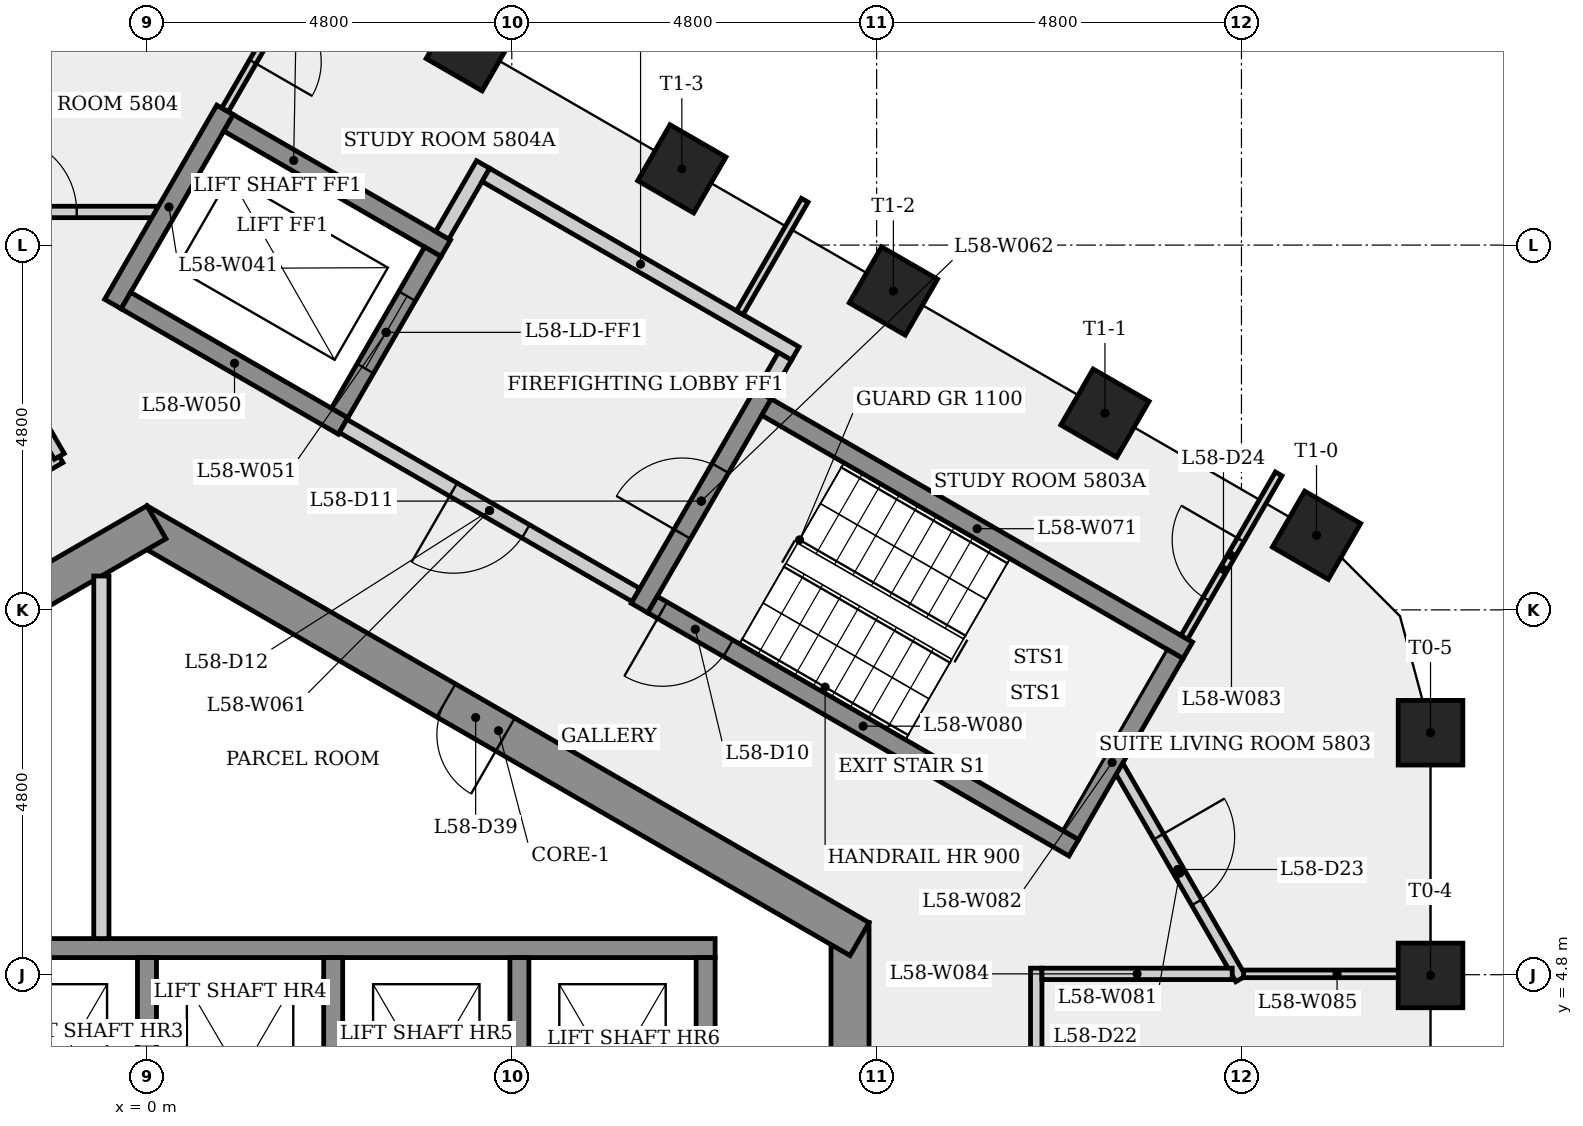
"""IFC4 building model, lengths in metres.
Left out: names, types, materials, properties, quantities, classifications, styles, units other than length and angle.
Written with IfcOpenShell. Run it as: python <this file> out.ifc"""

import sys

from ifc_helpers import new_model, si_unit, direction, frame, frame_2d, origin, origin_2d, place, context, subcontext, project, spatial, rectangle, extrude, element, fill, save


model = new_model("IFC4")
c1 = context("Model", 3, precision=1e-05, world=origin(), true_north=direction((0.0, 1.0)))
c2 = subcontext(c1, "Body", "Model", "MODEL_VIEW")
j1 = project(units=[si_unit("LENGTHUNIT", "METRE"), si_unit("PLANEANGLEUNIT", "RADIAN")], contexts=[c1])
p1 = place(None, origin())
s1 = spatial("IfcSite", under=j1, at=p1, CompositionType="ELEMENT")
p2 = place(p1, origin())
s2 = spatial("IfcBuilding", under=s1, at=p2, CompositionType="ELEMENT")
p3 = place(p2, frame((0.0, 0.0, 218.9)))
s3 = spatial("IfcBuildingStorey", under=s2, at=p3, CompositionType="ELEMENT", Elevation=218.9)
p4 = place(p3, frame((9.25, -5.485, 0.0), z_axis=(0.0, 0.0, 1.0), x_axis=(0.0, 1.0, 0.0)))
e1 = element("IfcWall", 1, at=p4, inside=s3, PredefinedType="SHEAR", context=c2, shape_type="SweptSolid", body=[
    extrude(rectangle(XDim=10.97, YDim=0.5, at=frame_2d((5.485, 0.0))), origin(), (0.0, 0.0, 1.0), 3.4),
])
p5 = place(p4, frame((4.685, 0.0, 0.0)))
e2 = element("IfcOpeningElement", 2, at=p5, cuts=e1, PredefinedType="OPENING", context=c2, shape_type="SweptSolid", body=[
    extrude(rectangle(XDim=1.6, YDim=2.1, at=frame_2d((0.8, 1.05))), frame((0.0, 0.26, 0.0), z_axis=(0.0, -1.0, 0.0), x_axis=(1.0, 0.0, 0.0)), (0.0, 0.0, 1.0), 0.52),
])
p6 = place(p3, frame((9.375, 5.268, 0.0), z_axis=(0.0, 0.0, 1.0), x_axis=(-0.866023993627, 0.500002442456, 0.0)))
e3 = element("IfcWall", 3, at=p6, inside=s3, PredefinedType="SHEAR", context=c2, shape_type="SweptSolid", body=[
    extrude(rectangle(XDim=10.97, YDim=0.5, at=frame_2d((5.485, 0.0))), origin(), (0.0, 0.0, 1.0), 3.4),
])
p7 = place(p6, frame((5.382, 0.0, 0.0)))
e4 = element("IfcOpeningElement", 4, at=p7, cuts=e3, PredefinedType="OPENING", context=c2, shape_type="SweptSolid", body=[
    extrude(rectangle(XDim=0.9, YDim=2.1, at=frame_2d((0.45, 1.05))), frame((0.0, 0.26, 0.0), z_axis=(0.0, -1.0, 0.0), x_axis=(1.0, 0.0, 0.0)), (0.0, 0.0, 1.0), 0.52),
])
p8 = place(p3, frame((0.125, 10.753, 0.0), z_axis=(0.0, 0.0, 1.0), x_axis=(-0.866023993627, -0.500002442456, 0.0)))
e5 = element("IfcWall", 5, at=p8, inside=s3, PredefinedType="SHEAR", context=c2, shape_type="SweptSolid", body=[
    extrude(rectangle(XDim=10.97, YDim=0.5, at=frame_2d((5.485, 0.0))), origin(), (0.0, 0.0, 1.0), 3.4),
])
p9 = place(p8, frame((7.08, 0.0, 0.0)))
e6 = element("IfcOpeningElement", 6, at=p9, cuts=e5, PredefinedType="OPENING", context=c2, shape_type="SweptSolid", body=[
    extrude(rectangle(XDim=0.9, YDim=2.1, at=frame_2d((0.45, 1.05))), frame((0.0, 0.26, 0.0), z_axis=(0.0, -1.0, 0.0), x_axis=(1.0, 0.0, 0.0)), (0.0, 0.0, 1.0), 0.52),
])
for number, where, z_axis, x_axis in (
    (7, (16.887, 4.79, 0.0), (0.0, 0.0, 1.0), (1.0, 0.0, 0.0)),
    (8, (16.887, 7.984, 0.0), (0.0, 0.0, 1.0), (1.0, 0.0, 0.0)),
    (9, (15.387, 10.582, 0.0), (0.0, 0.0, 1.0), (0.5, 0.866, 0.0)),
    (10, (12.604, 12.189, 0.0), (0.0, 0.0, 1.0), (0.5, 0.866, 0.0)),
    (11, (9.821, 13.796, 0.0), (0.0, 0.0, 1.0), (0.5, 0.866, 0.0)),
    (12, (7.037, 15.403, 0.0), (0.0, 0.0, 1.0), (0.5, 0.866, 0.0)),
    (13, (4.254, 17.01, 0.0), (0.0, 0.0, 1.0), (0.5, 0.866, 0.0)),
):
    element("IfcColumn", number, at=place(p3, frame(where, z_axis=z_axis, x_axis=x_axis)), inside=s3, PredefinedType="COLUMN", context=c2, shape_type="SweptSolid", body=[
        extrude(rectangle(XDim=0.85, YDim=0.85, at=origin_2d()), origin(), (0.0, 0.0, 1.0), 3.4),
    ])
p10 = place(p3, frame((-9.411, 6.829, 0.0), z_axis=(0.0, 0.0, 1.0), x_axis=(0.866029717158, 0.499992528944, 0.0)))
e14 = element("IfcWall", 14, at=p10, inside=s3, PredefinedType="PARTITIONING", context=c2, shape_type="SweptSolid", body=[
    extrude(rectangle(XDim=9.547, YDim=0.15, at=frame_2d((4.773, 0.0))), origin(), (0.0, 0.0, 1.0), 3.05),
])
p11 = place(p10, frame((4.273, 0.0, 0.0)))
e15 = element("IfcOpeningElement", 15, at=p11, cuts=e14, PredefinedType="OPENING", context=c2, shape_type="SweptSolid", body=[
    extrude(rectangle(XDim=1.0, YDim=2.1, at=frame_2d((0.5, 1.05))), frame((0.0, 0.085, 0.0), z_axis=(0.0, -1.0, 0.0), x_axis=(1.0, 0.0, 0.0)), (0.0, 0.0, 1.0), 0.17),
])
p12 = place(p3, frame((-7.225, 5.15, 0.0), z_axis=(0.0, 0.0, 1.0), x_axis=(1.0, 0.0, 0.0)))
e16 = element("IfcWall", 16, at=p12, inside=s3, PredefinedType="SHEAR", context=c2, shape_type="SweptSolid", body=[
    extrude(rectangle(XDim=14.7, YDim=0.25, at=frame_2d((7.35, 0.0))), origin(), (0.0, 0.0, 1.0), 3.05),
])
p13 = place(p3, frame((-3.085, 14.836, 0.0), z_axis=(0.0, 0.0, 1.0), x_axis=(1.0, 0.0, 0.0)))
e17 = element("IfcWall", 17, at=p13, inside=s3, PredefinedType="PARTITIONING", context=c2, shape_type="SweptSolid", body=[
    extrude(rectangle(XDim=3.212, YDim=0.15, at=frame_2d((1.606, 0.0))), origin(), (0.0, 0.0, 1.0), 3.05),
])
p14 = place(p13, frame((1.161, 0.0, 0.0)))
e18 = element("IfcOpeningElement", 18, at=p14, cuts=e17, PredefinedType="OPENING", context=c2, shape_type="SweptSolid", body=[
    extrude(rectangle(XDim=1.0, YDim=2.1, at=frame_2d((0.5, 1.05))), frame((0.0, 0.085, 0.0), z_axis=(0.0, -1.0, 0.0), x_axis=(1.0, 0.0, 0.0)), (0.0, 0.0, 1.0), 0.17),
])
p15 = place(p3, frame((-1.369, 11.993, 0.0), z_axis=(0.0, 0.0, 1.0), x_axis=(0.499853131152, -0.86611018195, 0.0)))
e19 = element("IfcWall", 19, at=p15, inside=s3, PredefinedType="PARTITIONING", context=c2, shape_type="SweptSolid", body=[
    extrude(rectangle(XDim=0.431, YDim=0.15, at=frame_2d((0.216, 0.0))), origin(), (0.0, 0.0, 1.0), 3.05),
])
p16 = place(p3, frame((-0.6, 10.046, 0.0), z_axis=(0.0, 0.0, 1.0), x_axis=(0.0, -1.0, 0.0)))
e20 = element("IfcWall", 20, at=p16, inside=s3, PredefinedType="PARTITIONING", context=c2, shape_type="SweptSolid", body=[
    extrude(rectangle(XDim=4.771, YDim=0.2, at=frame_2d((2.385, 0.0))), origin(), (0.0, 0.0, 1.0), 3.05),
])
p17 = place(p3, frame((-0.448, 13.624, 0.0), z_axis=(0.0, 0.0, 1.0), x_axis=(0.500037662692, 0.866003658127, 0.0)))
e21 = element("IfcWall", 21, at=p17, inside=s3, PredefinedType="SHEAR", context=c2, shape_type="SweptSolid", body=[
    extrude(rectangle(XDim=2.95, YDim=0.25, at=frame_2d((1.475, 0.0))), origin(), (0.0, 0.0, 1.0), 3.05),
])
p18 = place(p3, frame((0.0, 5.025, 0.0), z_axis=(0.0, 0.0, 1.0), x_axis=(0.0, -1.0, 0.0)))
e22 = element("IfcWall", 22, at=p18, inside=s3, PredefinedType="SHEAR", context=c2, shape_type="SweptSolid", body=[
    extrude(rectangle(XDim=3.1, YDim=0.25, at=frame_2d((1.55, 0.0))), origin(), (0.0, 0.0, 1.0), 3.4),
])
p19 = place(p3, frame((1.073, 16.008, 0.0), z_axis=(0.0, 0.0, 1.0), x_axis=(0.866040211805, -0.499974350878, 0.0)))
e23 = element("IfcWall", 23, at=p19, inside=s3, PredefinedType="SHEAR", context=c2, shape_type="SweptSolid", body=[
    extrude(rectangle(XDim=3.3, YDim=0.25, at=frame_2d((1.65, 0.0))), origin(), (0.0, 0.0, 1.0), 3.05),
])
p20 = place(p3, frame((2.419, 18.59, 0.0), z_axis=(0.0, 0.0, 1.0), x_axis=(-0.500016013541, -0.866016158165, 0.0)))
e24 = element("IfcWall", 24, at=p20, inside=s3, PredefinedType="PARTITIONING", context=c2, shape_type="SweptSolid", body=[
    extrude(rectangle(XDim=2.784, YDim=0.1, at=frame_2d((1.392, 0.0))), origin(), (0.0, 0.0, 1.0), 3.05),
])
p21 = place(p20, frame((1.152, 0.0, 0.0)))
e25 = element("IfcOpeningElement", 25, at=p21, cuts=e24, PredefinedType="OPENING", context=c2, shape_type="SweptSolid", body=[
    extrude(rectangle(XDim=0.9, YDim=2.1, at=frame_2d((0.45, 1.05))), frame((0.0, 0.06, 0.0), z_axis=(0.0, -1.0, 0.0), x_axis=(1.0, 0.0, 0.0)), (0.0, 0.0, 1.0), 0.12),
])
p22 = place(p3, frame((2.45, 5.025, 0.0), z_axis=(0.0, 0.0, 1.0), x_axis=(0.0, -1.0, 0.0)))
e26 = element("IfcWall", 26, at=p22, inside=s3, PredefinedType="SHEAR", context=c2, shape_type="SweptSolid", body=[
    extrude(rectangle(XDim=3.1, YDim=0.25, at=frame_2d((1.55, 0.0))), origin(), (0.0, 0.0, 1.0), 3.4),
])
p23 = place(p3, frame((2.581, 12.02, 0.0), z_axis=(0.0, 0.0, 1.0), x_axis=(-0.866040211805, 0.499974350878, 0.0)))
e27 = element("IfcWall", 27, at=p23, inside=s3, PredefinedType="SHEAR", context=c2, shape_type="SweptSolid", body=[
    extrude(rectangle(XDim=3.3, YDim=0.25, at=frame_2d((1.65, 0.0))), origin(), (0.0, 0.0, 1.0), 3.05),
])
p24 = place(p3, frame((2.535, 12.191, 0.0), z_axis=(0.0, 0.0, 1.0), x_axis=(0.500061746146, 0.865989751695, 0.0)))
e28 = element("IfcWall", 28, at=p24, inside=s3, PredefinedType="SHEAR", context=c2, shape_type="SweptSolid", body=[
    extrude(rectangle(XDim=2.45, YDim=0.25, at=frame_2d((1.225, 0.0))), origin(), (0.0, 0.0, 1.0), 3.4),
])
p25 = place(p24, frame((0.675, 0.0, 0.0)))
e29 = element("IfcOpeningElement", 29, at=p25, cuts=e28, PredefinedType="OPENING", context=c2, shape_type="SweptSolid", body=[
    extrude(rectangle(XDim=1.1, YDim=2.1, at=frame_2d((0.55, 1.05))), frame((0.0, 0.135, 0.0), z_axis=(0.0, -1.0, 0.0), x_axis=(1.0, 0.0, 0.0)), (0.0, 0.0, 1.0), 0.27),
])
p26 = place(p3, frame((3.885, 14.529, 0.0), z_axis=(0.0, 0.0, 1.0), x_axis=(0.499997628298, 0.866026773083, 0.0)))
e30 = element("IfcWall", 30, at=p26, inside=s3, PredefinedType="PARTITIONING", context=c2, shape_type="SweptSolid", body=[
    extrude(rectangle(XDim=1.075, YDim=0.2, at=frame_2d((0.538, 0.0))), origin(), (0.0, 0.0, 1.0), 3.05),
])
p27 = place(p3, frame((4.459, 15.323, 0.0), z_axis=(0.0, 0.0, 1.0), x_axis=(0.866016039709, -0.500016218704, 0.0)))
e31 = element("IfcWall", 31, at=p27, inside=s3, PredefinedType="PARTITIONING", context=c2, shape_type="SweptSolid", body=[
    extrude(rectangle(XDim=4.7, YDim=0.2, at=frame_2d((2.35, 0.0))), origin(), (0.0, 0.0, 1.0), 3.05),
])
p28 = place(p3, frame((4.9, 5.025, 0.0), z_axis=(0.0, 0.0, 1.0), x_axis=(0.0, -1.0, 0.0)))
e32 = element("IfcWall", 32, at=p28, inside=s3, PredefinedType="SHEAR", context=c2, shape_type="SweptSolid", body=[
    extrude(rectangle(XDim=3.1, YDim=0.25, at=frame_2d((1.55, 0.0))), origin(), (0.0, 0.0, 1.0), 3.4),
])
p29 = place(p3, frame((6.435, 9.795, 0.0), z_axis=(0.0, 0.0, 1.0), x_axis=(-0.866012907634, 0.500021643343, 0.0)))
e33 = element("IfcWall", 33, at=p29, inside=s3, PredefinedType="PARTITIONING", context=c2, shape_type="SweptSolid", body=[
    extrude(rectangle(XDim=4.45, YDim=0.2, at=frame_2d((2.225, 0.0))), origin(), (0.0, 0.0, 1.0), 3.05),
])
p30 = place(p29, frame((1.675, 0.0, 0.0)))
e34 = element("IfcOpeningElement", 34, at=p30, cuts=e33, PredefinedType="OPENING", context=c2, shape_type="SweptSolid", body=[
    extrude(rectangle(XDim=1.1, YDim=2.1, at=frame_2d((0.55, 1.05))), frame((0.0, 0.11, 0.0), z_axis=(0.0, -1.0, 0.0), x_axis=(1.0, 0.0, 0.0)), (0.0, 0.0, 1.0), 0.22),
])
p31 = place(p3, frame((6.48, 9.624, 0.0), z_axis=(0.0, 0.0, 1.0), x_axis=(0.500017246033, 0.866015446554, 0.0)))
e35 = element("IfcWall", 35, at=p31, inside=s3, PredefinedType="SHEAR", context=c2, shape_type="SweptSolid", body=[
    extrude(rectangle(XDim=3.25, YDim=0.25, at=frame_2d((1.625, 0.0))), origin(), (0.0, 0.0, 1.0), 3.05),
])
p32 = place(p31, frame((1.125, 0.0, 0.0)))
e36 = element("IfcOpeningElement", 36, at=p32, cuts=e35, PredefinedType="OPENING", context=c2, shape_type="SweptSolid", body=[
    extrude(rectangle(XDim=1.0, YDim=2.1, at=frame_2d((0.5, 1.05))), frame((0.0, 0.135, 0.0), z_axis=(0.0, -1.0, 0.0), x_axis=(1.0, 0.0, 0.0)), (0.0, 0.0, 1.0), 0.27),
])
p33 = place(p3, frame((7.35, 5.025, 0.0), z_axis=(0.0, 0.0, 1.0), x_axis=(0.0, -1.0, 0.0)))
e37 = element("IfcWall", 37, at=p33, inside=s3, PredefinedType="SHEAR", context=c2, shape_type="SweptSolid", body=[
    extrude(rectangle(XDim=3.1, YDim=0.25, at=frame_2d((1.55, 0.0))), origin(), (0.0, 0.0, 1.0), 3.4),
])
p34 = place(p3, frame((7.8, 13.51, 0.0), z_axis=(0.0, 0.0, 1.0), x_axis=(0.500027584368, 0.866009477356, 0.0)))
e38 = element("IfcWall", 38, at=p34, inside=s3, PredefinedType="PARTITIONING", context=c2, shape_type="SweptSolid", body=[
    extrude(rectangle(XDim=1.708, YDim=0.1, at=frame_2d((0.854, 0.0))), origin(), (0.0, 0.0, 1.0), 3.05),
])
p35 = place(p3, frame((8.151, 12.268, 0.0), z_axis=(0.0, 0.0, 1.0), x_axis=(0.866025499775, -0.499999833739, 0.0)))
e39 = element("IfcWall", 39, at=p35, inside=s3, PredefinedType="SHEAR", context=c2, shape_type="SweptSolid", body=[
    extrude(rectangle(XDim=6.4, YDim=0.25, at=frame_2d((3.2, 0.0))), origin(), (0.0, 0.0, 1.0), 3.05),
])
p36 = place(p3, frame((8.393, 12.937, 0.0), z_axis=(0.0, 0.0, 1.0), x_axis=(-0.500065409566, -0.86598763626, 0.0)))
e40 = element("IfcWall", 40, at=p36, inside=s3, PredefinedType="PARTITIONING", context=c2, shape_type="SweptSolid", body=[
    extrude(rectangle(XDim=0.575, YDim=0.2, at=frame_2d((0.288, 0.0))), origin(), (0.0, 0.0, 1.0), 3.05),
])
p37 = place(p3, frame((11.7, -4.736, 0.0), z_axis=(0.0, 0.0, 1.0), x_axis=(0.0, 1.0, 0.0)))
e41 = element("IfcWall", 41, at=p37, inside=s3, PredefinedType="PARTITIONING", context=c2, shape_type="SweptSolid", body=[
    extrude(rectangle(XDim=9.622, YDim=0.15, at=frame_2d((4.811, 0.0))), origin(), (0.0, 0.0, 1.0), 3.05),
])
p38 = place(p37, frame((2.655, 0.0, 0.0)))
e42 = element("IfcOpeningElement", 42, at=p38, cuts=e41, PredefinedType="OPENING", context=c2, shape_type="SweptSolid", body=[
    extrude(rectangle(XDim=1.0, YDim=2.1, at=frame_2d((0.5, 1.05))), frame((0.0, 0.085, 0.0), z_axis=(0.0, -1.0, 0.0), x_axis=(1.0, 0.0, 0.0)), (0.0, 0.0, 1.0), 0.17),
])
p39 = place(p37, frame((7.443, 0.0, 0.0)))
e43 = element("IfcOpeningElement", 43, at=p39, cuts=e41, PredefinedType="OPENING", context=c2, shape_type="SweptSolid", body=[
    extrude(rectangle(XDim=1.0, YDim=2.1, at=frame_2d((0.5, 1.05))), frame((0.0, 0.085, 0.0), z_axis=(0.0, -1.0, 0.0), x_axis=(1.0, 0.0, 0.0)), (0.0, 0.0, 1.0), 0.17),
])
p40 = place(p3, frame((12.194, 6.47, 0.0), z_axis=(0.0, 0.0, 1.0), x_axis=(-0.866025499775, 0.499999833739, 0.0)))
e44 = element("IfcWall", 44, at=p40, inside=s3, PredefinedType="SHEAR", context=c2, shape_type="SweptSolid", body=[
    extrude(rectangle(XDim=6.4, YDim=0.25, at=frame_2d((3.2, 0.0))), origin(), (0.0, 0.0, 1.0), 3.05),
])
p41 = place(p40, frame((5.25, 0.0, 0.0)))
e45 = element("IfcOpeningElement", 45, at=p41, cuts=e44, PredefinedType="OPENING", context=c2, shape_type="SweptSolid", body=[
    extrude(rectangle(XDim=1.0, YDim=2.1, at=frame_2d((0.5, 1.05))), frame((0.0, 0.135, 0.0), z_axis=(0.0, -1.0, 0.0), x_axis=(1.0, 0.0, 0.0)), (0.0, 0.0, 1.0), 0.27),
])
p42 = place(p3, frame((12.785, 7.528, 0.0), z_axis=(0.0, 0.0, 1.0), x_axis=(0.500038251005, -0.86600331843, 0.0)))
e46 = element("IfcWall", 46, at=p42, inside=s3, PredefinedType="PARTITIONING", context=c2, shape_type="SweptSolid", body=[
    extrude(rectangle(XDim=3.212, YDim=0.15, at=frame_2d((1.606, 0.0))), origin(), (0.0, 0.0, 1.0), 3.05),
])
p43 = place(p42, frame((1.051, 0.0, 0.0)))
e47 = element("IfcOpeningElement", 47, at=p43, cuts=e46, PredefinedType="OPENING", context=c2, shape_type="SweptSolid", body=[
    extrude(rectangle(XDim=1.0, YDim=2.1, at=frame_2d((0.5, 1.05))), frame((0.0, 0.085, 0.0), z_axis=(0.0, -1.0, 0.0), x_axis=(1.0, 0.0, 0.0)), (0.0, 0.0, 1.0), 0.17),
])
p44 = place(p3, frame((12.148, 6.641, 0.0), z_axis=(0.0, 0.0, 1.0), x_axis=(0.500034990121, 0.866005201286, 0.0)))
e48 = element("IfcWall", 48, at=p44, inside=s3, PredefinedType="SHEAR", context=c2, shape_type="SweptSolid", body=[
    extrude(rectangle(XDim=2.75, YDim=0.25, at=frame_2d((1.375, 0.0))), origin(), (0.0, 0.0, 1.0), 3.05),
])
p45 = place(p3, frame((13.648, 9.239, 0.0), z_axis=(0.0, 0.0, 1.0), x_axis=(0.500040114371, 0.866002242503, 0.0)))
e49 = element("IfcWall", 49, at=p45, inside=s3, PredefinedType="PARTITIONING", context=c2, shape_type="SweptSolid", body=[
    extrude(rectangle(XDim=2.484, YDim=0.1, at=frame_2d((1.242, 0.0))), origin(), (0.0, 0.0, 1.0), 3.05),
])
p46 = place(p45, frame((0.581, 0.0, 0.0)))
e50 = element("IfcOpeningElement", 50, at=p46, cuts=e49, PredefinedType="OPENING", context=c2, shape_type="SweptSolid", body=[
    extrude(rectangle(XDim=0.9, YDim=2.1, at=frame_2d((0.45, 1.05))), frame((0.0, 0.06, 0.0), z_axis=(0.0, -1.0, 0.0), x_axis=(1.0, 0.0, 0.0)), (0.0, 0.0, 1.0), 0.12),
])
p47 = place(p3, frame((14.279, 4.811, 0.0), z_axis=(0.0, 0.0, 1.0), x_axis=(-1.0, 0.0, 0.0)))
e51 = element("IfcWall", 51, at=p47, inside=s3, PredefinedType="PARTITIONING", context=c2, shape_type="SweptSolid", body=[
    extrude(rectangle(XDim=2.504, YDim=0.15, at=frame_2d((1.252, 0.0))), origin(), (0.0, 0.0, 1.0), 3.05),
])
p48 = place(p3, frame((14.428, 4.811, 0.0), z_axis=(0.0, 0.0, 1.0), x_axis=(1.0, 0.0, 0.0)))
e52 = element("IfcWall", 52, at=p48, inside=s3, PredefinedType="PARTITIONING", context=c2, shape_type="SweptSolid", body=[
    extrude(rectangle(XDim=2.459, YDim=0.1, at=frame_2d((1.229, 0.0))), origin(), (0.0, 0.0, 1.0), 3.05),
])
p49 = place(p41, origin())
e53 = element("IfcDoor", 53, at=p49, inside=s3, OperationType="SINGLE_SWING_RIGHT", PredefinedType="DOOR", context=c2, shape_type="SweptSolid", body=[
    extrude(rectangle(XDim=1.0, YDim=2.1, at=frame_2d((0.5, 1.05))), frame((0.0, 0.025, 0.0), z_axis=(0.0, -1.0, 0.0), x_axis=(1.0, 0.0, 0.0)), (0.0, 0.0, 1.0), 0.05),
])
fill(e45, e53)
p50 = place(p32, origin())
e54 = element("IfcDoor", 54, at=p50, inside=s3, OperationType="SINGLE_SWING_LEFT", PredefinedType="DOOR", context=c2, shape_type="SweptSolid", body=[
    extrude(rectangle(XDim=1.0, YDim=2.1, at=frame_2d((0.5, 1.05))), frame((0.0, 0.025, 0.0), z_axis=(0.0, -1.0, 0.0), x_axis=(1.0, 0.0, 0.0)), (0.0, 0.0, 1.0), 0.05),
])
fill(e36, e54)
p51 = place(p30, origin())
e55 = element("IfcDoor", 55, at=p51, inside=s3, OperationType="SINGLE_SWING_RIGHT", PredefinedType="DOOR", context=c2, shape_type="SweptSolid", body=[
    extrude(rectangle(XDim=1.1, YDim=2.1, at=frame_2d((0.55, 1.05))), frame((0.0, 0.025, 0.0), z_axis=(0.0, -1.0, 0.0), x_axis=(1.0, 0.0, 0.0)), (0.0, 0.0, 1.0), 0.05),
])
fill(e34, e55)
p52 = place(p25, origin())
e56 = element("IfcDoor", 56, at=p52, inside=s3, OperationType="SLIDING_TO_LEFT", PredefinedType="DOOR", context=c2, shape_type="SweptSolid", body=[
    extrude(rectangle(XDim=1.1, YDim=2.1, at=frame_2d((0.55, 1.05))), frame((0.0, 0.025, 0.0), z_axis=(0.0, -1.0, 0.0), x_axis=(1.0, 0.0, 0.0)), (0.0, 0.0, 1.0), 0.05),
])
fill(e29, e56)
p53 = place(p43, origin())
e57 = element("IfcDoor", 57, at=p53, inside=s3, OperationType="SINGLE_SWING_LEFT", PredefinedType="DOOR", context=c2, shape_type="SweptSolid", body=[
    extrude(rectangle(XDim=1.0, YDim=2.1, at=frame_2d((0.5, 1.05))), frame((0.0, 0.025, 0.0), z_axis=(0.0, -1.0, 0.0), x_axis=(1.0, 0.0, 0.0)), (0.0, 0.0, 1.0), 0.05),
])
fill(e47, e57)
p54 = place(p46, origin())
e58 = element("IfcDoor", 58, at=p54, inside=s3, OperationType="SINGLE_SWING_RIGHT", PredefinedType="DOOR", context=c2, shape_type="SweptSolid", body=[
    extrude(rectangle(XDim=0.9, YDim=2.1, at=frame_2d((0.45, 1.05))), frame((0.0, 0.025, 0.0), z_axis=(0.0, -1.0, 0.0), x_axis=(1.0, 0.0, 0.0)), (0.0, 0.0, 1.0), 0.05),
])
fill(e50, e58)
p55 = place(p14, origin())
e59 = element("IfcDoor", 59, at=p55, inside=s3, OperationType="SINGLE_SWING_LEFT", PredefinedType="DOOR", context=c2, shape_type="SweptSolid", body=[
    extrude(rectangle(XDim=1.0, YDim=2.1, at=frame_2d((0.5, 1.05))), frame((0.0, 0.025, 0.0), z_axis=(0.0, -1.0, 0.0), x_axis=(1.0, 0.0, 0.0)), (0.0, 0.0, 1.0), 0.05),
])
fill(e18, e59)
p56 = place(p21, origin())
e60 = element("IfcDoor", 60, at=p56, inside=s3, OperationType="SINGLE_SWING_RIGHT", PredefinedType="DOOR", context=c2, shape_type="SweptSolid", body=[
    extrude(rectangle(XDim=0.9, YDim=2.1, at=frame_2d((0.45, 1.05))), frame((0.0, 0.025, 0.0), z_axis=(0.0, -1.0, 0.0), x_axis=(1.0, 0.0, 0.0)), (0.0, 0.0, 1.0), 0.05),
])
fill(e25, e60)
p57 = place(p7, origin())
e61 = element("IfcDoor", 61, at=p57, inside=s3, OperationType="SINGLE_SWING_LEFT", PredefinedType="DOOR", context=c2, shape_type="SweptSolid", body=[
    extrude(rectangle(XDim=0.9, YDim=2.1, at=frame_2d((0.45, 1.05))), frame((0.0, 0.025, 0.0), z_axis=(0.0, -1.0, 0.0), x_axis=(1.0, 0.0, 0.0)), (0.0, 0.0, 1.0), 0.05),
])
fill(e4, e61)
save(model, sys.argv[1])
